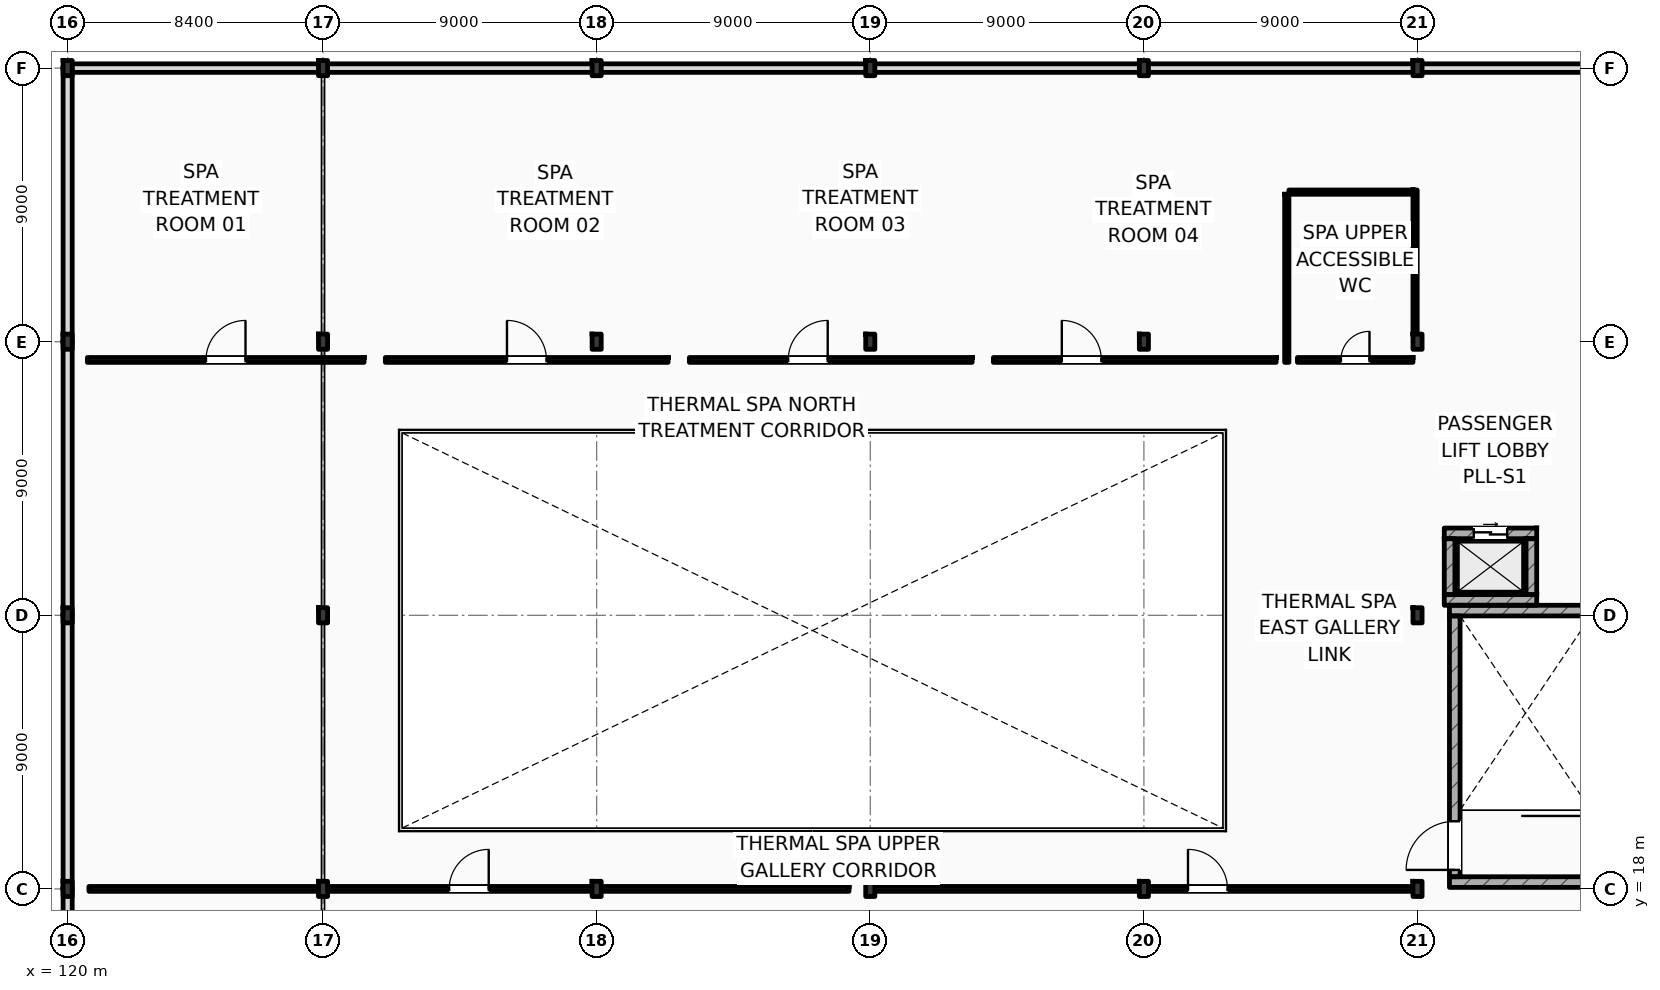
"""IFC4 building model, lengths in metres.
Left out: names, types, materials, properties, quantities, classifications, styles, units other than length and angle.
Written with IfcOpenShell. Run it as: python <this file> out.ifc"""

import sys

from ifc_helpers import new_model, si_unit, direction, frame, frame_2d, origin, origin_2d, place, context, subcontext, project, spatial, rectangle, i_section, extrude, element, fill, save


model = new_model("IFC4")
c1 = context("Model", 3, precision=1e-05, world=origin(), true_north=direction((0.0, 1.0)))
c2 = subcontext(c1, "Body", "Model", "MODEL_VIEW")
j1 = project(units=[si_unit("LENGTHUNIT", "METRE"), si_unit("PLANEANGLEUNIT", "RADIAN")], contexts=[c1])
p1 = place(None, origin())
s1 = spatial("IfcSite", under=j1, at=p1, CompositionType="ELEMENT")
p2 = place(p1, origin())
s2 = spatial("IfcBuilding", under=s1, at=p2, CompositionType="ELEMENT")
p3 = place(p2, frame((0.0, 0.0, 6.0)))
s3 = spatial("IfcBuildingStorey", under=s2, at=p3, CompositionType="ELEMENT", Elevation=6.0)
for number, where, z_axis, x_axis in (
    (1, (120.0, 18.0, 0.0), (0.0, 0.0, 1.0), (1.0, 0.0, 0.0)),
    (2, (120.0, 27.0, 0.0), (0.0, 0.0, 1.0), (1.0, 0.0, 0.0)),
    (3, (120.0, 36.0, 0.0), (0.0, 0.0, 1.0), (1.0, 0.0, 0.0)),
    (4, (120.0, 45.0, 0.0), (0.0, 0.0, 1.0), (1.0, 0.0, 0.0)),
    (5, (128.4, 18.0, 0.0), (0.0, 0.0, 1.0), (1.0, 0.0, 0.0)),
    (6, (128.4, 27.0, 0.0), (0.0, 0.0, 1.0), (1.0, 0.0, 0.0)),
    (7, (128.4, 36.0, 0.0), (0.0, 0.0, 1.0), (1.0, 0.0, 0.0)),
    (8, (128.4, 45.0, 0.0), (0.0, 0.0, 1.0), (1.0, 0.0, 0.0)),
    (9, (137.4, 18.0, 0.0), (0.0, 0.0, 1.0), (1.0, 0.0, 0.0)),
    (10, (137.4, 36.0, 0.0), (0.0, 0.0, 1.0), (1.0, 0.0, 0.0)),
    (11, (137.4, 45.0, 0.0), (0.0, 0.0, 1.0), (1.0, 0.0, 0.0)),
    (12, (146.4, 18.0, 0.0), (0.0, 0.0, 1.0), (1.0, 0.0, 0.0)),
    (13, (146.4, 36.0, 0.0), (0.0, 0.0, 1.0), (1.0, 0.0, 0.0)),
    (14, (146.4, 45.0, 0.0), (0.0, 0.0, 1.0), (1.0, 0.0, 0.0)),
    (15, (155.4, 18.0, 0.0), (0.0, 0.0, 1.0), (1.0, 0.0, 0.0)),
    (16, (155.4, 36.0, 0.0), (0.0, 0.0, 1.0), (1.0, 0.0, 0.0)),
    (17, (155.4, 45.0, 0.0), (0.0, 0.0, 1.0), (1.0, 0.0, 0.0)),
    (18, (164.4, 18.0, 0.0), (0.0, 0.0, 1.0), (1.0, 0.0, 0.0)),
    (19, (164.4, 27.0, 0.0), (0.0, 0.0, 1.0), (1.0, 0.0, 0.0)),
    (20, (164.4, 36.0, 0.0), (0.0, 0.0, 1.0), (1.0, 0.0, 0.0)),
    (21, (164.4, 45.0, 0.0), (0.0, 0.0, 1.0), (1.0, 0.0, 0.0)),
):
    element("IfcColumn", number, at=place(p3, frame(where, z_axis=z_axis, x_axis=x_axis)), inside=s3, PredefinedType="COLUMN", context=c2, shape_type="SweptSolid", body=[
        extrude(i_section(OverallWidth=0.3, OverallDepth=0.5, WebThickness=0.014, FlangeThickness=0.028, FilletRadius=0.027, at=origin_2d()), origin(), (0.0, 0.0, 1.0), 5.4),
    ])
for number, where, z_axis, x_axis in (
    (22, (165.45, 27.155, 0.0), (0.0, 0.0, 1.0), (1.0, 0.0, 0.0)),
    (23, (165.45, 18.225, 0.0), (0.0, 0.0, 1.0), (1.0, 0.0, 0.0)),
):
    element("IfcWall", number, at=place(p3, frame(where, z_axis=z_axis, x_axis=x_axis)), inside=s3, PredefinedType="SHEAR", context=c2, shape_type="SweptSolid", body=[
        extrude(rectangle(XDim=5.0, YDim=0.35, at=frame_2d((2.5, 0.0))), origin(), (0.0, 0.0, 1.0), 5.4),
    ])
p4 = place(p3, frame((165.625, 18.4, 0.0), z_axis=(0.0, 0.0, 1.0), x_axis=(0.0, 1.0, 0.0)))
e24 = element("IfcWall", 24, at=p4, inside=s3, PredefinedType="SHEAR", context=c2, shape_type="SweptSolid", body=[
    extrude(rectangle(XDim=8.58, YDim=0.35, at=frame_2d((4.29, 0.0))), origin(), (0.0, 0.0, 1.0), 5.4),
])
p5 = place(p4, frame((0.225, 0.0, 0.0)))
e25 = element("IfcOpeningElement", 25, at=p5, cuts=e24, PredefinedType="OPENING", context=c2, shape_type="SweptSolid", body=[
    extrude(rectangle(XDim=1.6, YDim=2.2, at=frame_2d((0.8, 1.1))), frame((0.0, 0.185, 0.0), z_axis=(0.0, -1.0, 0.0), x_axis=(1.0, 0.0, 0.0)), (0.0, 0.0, 1.0), 0.37),
])
p6 = place(p3, frame((120.0, 45.0, 0.0), z_axis=(0.0, 0.0, 1.0), x_axis=(1.0, 0.0, 0.0)))
e26 = element("IfcWall", 26, at=p6, inside=s3, PredefinedType="STANDARD", context=c2, shape_type="SweptSolid", body=[
    extrude(rectangle(XDim=8.4, YDim=0.28, at=frame_2d((4.2, 0.0))), origin(), (0.0, 0.0, 1.0), 4.49),
])
for number, where, z_axis, x_axis in (
    (27, (128.4, 45.0, 0.0), (0.0, 0.0, 1.0), (1.0, 0.0, 0.0)),
    (28, (137.4, 45.0, 0.0), (0.0, 0.0, 1.0), (1.0, 0.0, 0.0)),
    (29, (146.4, 45.0, 0.0), (0.0, 0.0, 1.0), (1.0, 0.0, 0.0)),
    (30, (155.4, 45.0, 0.0), (0.0, 0.0, 1.0), (1.0, 0.0, 0.0)),
):
    element("IfcWall", number, at=place(p3, frame(where, z_axis=z_axis, x_axis=x_axis)), inside=s3, PredefinedType="STANDARD", context=c2, shape_type="SweptSolid", body=[
        extrude(rectangle(XDim=9.0, YDim=0.28, at=frame_2d((4.5, 0.0))), origin(), (0.0, 0.0, 1.0), 4.44),
    ])
p7 = place(p3, frame((164.4, 45.0, 0.0), z_axis=(0.0, 0.0, 1.0), x_axis=(1.0, 0.0, 0.0)))
e31 = element("IfcWall", 31, at=p7, inside=s3, PredefinedType="STANDARD", context=c2, shape_type="SweptSolid", body=[
    extrude(rectangle(XDim=7.6, YDim=0.28, at=frame_2d((3.8, 0.0))), origin(), (0.0, 0.0, 1.0), 4.54),
])
for number, where, z_axis, x_axis in (
    (32, (120.0, 9.0, 0.0), (0.0, 0.0, 1.0), (0.0, 1.0, 0.0)),
    (33, (120.0, 18.0, 0.0), (0.0, 0.0, 1.0), (0.0, 1.0, 0.0)),
    (34, (120.0, 27.0, 0.0), (0.0, 0.0, 1.0), (0.0, 1.0, 0.0)),
    (35, (120.0, 36.0, 0.0), (0.0, 0.0, 1.0), (0.0, 1.0, 0.0)),
):
    element("IfcWall", number, at=place(p3, frame(where, z_axis=z_axis, x_axis=x_axis)), inside=s3, PredefinedType="STANDARD", context=c2, shape_type="SweptSolid", body=[
        extrude(rectangle(XDim=9.0, YDim=0.3, at=frame_2d((4.5, 0.0))), origin(), (0.0, 0.0, 1.0), 4.55),
    ])
p8 = place(p3, frame((165.28, 29.695, 0.0), z_axis=(0.0, 0.0, 1.0), x_axis=(1.0, 0.0, 0.0)))
e36 = element("IfcWall", 36, at=p8, inside=s3, PredefinedType="SHEAR", context=c2, shape_type="SweptSolid", body=[
    extrude(rectangle(XDim=3.04, YDim=0.35, at=frame_2d((1.52, 0.0))), origin(), (0.0, 0.0, 1.0), 5.05),
])
p9 = place(p8, frame((0.97, 0.0, 0.0)))
e37 = element("IfcOpeningElement", 37, at=p9, cuts=e36, PredefinedType="OPENING", context=c2, shape_type="SweptSolid", body=[
    extrude(rectangle(XDim=1.1, YDim=2.2, at=frame_2d((0.55, 1.1))), frame((0.0, 0.185, 0.0), z_axis=(0.0, -1.0, 0.0), x_axis=(1.0, 0.0, 0.0)), (0.0, 0.0, 1.0), 0.37),
])
p10 = place(p3, frame((165.28, 27.505, 0.0), z_axis=(0.0, 0.0, 1.0), x_axis=(1.0, 0.0, 0.0)))
e38 = element("IfcWall", 38, at=p10, inside=s3, PredefinedType="SHEAR", context=c2, shape_type="SweptSolid", body=[
    extrude(rectangle(XDim=3.04, YDim=0.35, at=frame_2d((1.52, 0.0))), origin(), (0.0, 0.0, 1.0), 5.05),
])
for number, where, z_axis, x_axis in (
    (39, (165.455, 27.68, 0.0), (0.0, 0.0, 1.0), (0.0, 1.0, 0.0)),
    (40, (168.145, 27.68, 0.0), (0.0, 0.0, 1.0), (0.0, 1.0, 0.0)),
):
    element("IfcWall", number, at=place(p3, frame(where, z_axis=z_axis, x_axis=x_axis)), inside=s3, PredefinedType="SHEAR", context=c2, shape_type="SweptSolid", body=[
        extrude(rectangle(XDim=1.84, YDim=0.35, at=frame_2d((0.92, 0.0))), origin(), (0.0, 0.0, 1.0), 5.05),
    ])
p11 = place(p3, frame((120.7, 18.0, 0.0), z_axis=(0.0, 0.0, 1.0), x_axis=(1.0, 0.0, 0.0)))
e41 = element("IfcWall", 41, at=p11, inside=s3, PredefinedType="PARTITIONING", context=c2, shape_type="SweptSolid", body=[
    extrude(rectangle(XDim=25.0, YDim=0.16, at=frame_2d((12.5, 0.0))), origin(), (0.0, 0.0, 1.0), 4.44),
])
p12 = place(p11, frame((11.85, 0.0, 0.0)))
e42 = element("IfcOpeningElement", 42, at=p12, cuts=e41, PredefinedType="OPENING", context=c2, shape_type="SweptSolid", body=[
    extrude(rectangle(XDim=1.3, YDim=2.2, at=frame_2d((0.65, 1.1))), frame((0.0, 0.09, 0.0), z_axis=(0.0, -1.0, 0.0), x_axis=(1.0, 0.0, 0.0)), (0.0, 0.0, 1.0), 0.18),
])
p13 = place(p3, frame((146.5, 18.0, 0.0), z_axis=(0.0, 0.0, 1.0), x_axis=(1.0, 0.0, 0.0)))
e43 = element("IfcWall", 43, at=p13, inside=s3, PredefinedType="PARTITIONING", context=c2, shape_type="SweptSolid", body=[
    extrude(rectangle(XDim=18.0, YDim=0.16, at=frame_2d((9.0, 0.0))), origin(), (0.0, 0.0, 1.0), 4.44),
])
p14 = place(p13, frame((10.35, 0.0, 0.0)))
e44 = element("IfcOpeningElement", 44, at=p14, cuts=e43, PredefinedType="OPENING", context=c2, shape_type="SweptSolid", body=[
    extrude(rectangle(XDim=1.3, YDim=2.2, at=frame_2d((0.65, 1.1))), frame((0.0, 0.09, 0.0), z_axis=(0.0, -1.0, 0.0), x_axis=(1.0, 0.0, 0.0)), (0.0, 0.0, 1.0), 0.18),
])
p15 = place(p3, frame((120.65, 35.4, 0.0), z_axis=(0.0, 0.0, 1.0), x_axis=(1.0, 0.0, 0.0)))
e45 = element("IfcWall", 45, at=p15, inside=s3, PredefinedType="PARTITIONING", context=c2, shape_type="SweptSolid", body=[
    extrude(rectangle(XDim=9.1, YDim=0.16, at=frame_2d((4.55, 0.0))), origin(), (0.0, 0.0, 1.0), 5.05),
])
p16 = place(p15, frame((3.9, 0.0, 0.0)))
e46 = element("IfcOpeningElement", 46, at=p16, cuts=e45, PredefinedType="OPENING", context=c2, shape_type="SweptSolid", body=[
    extrude(rectangle(XDim=1.3, YDim=2.2, at=frame_2d((0.65, 1.1))), frame((0.0, 0.09, 0.0), z_axis=(0.0, -1.0, 0.0), x_axis=(1.0, 0.0, 0.0)), (0.0, 0.0, 1.0), 0.18),
])
p17 = place(p3, frame((130.45, 35.4, 0.0), z_axis=(0.0, 0.0, 1.0), x_axis=(1.0, 0.0, 0.0)))
e47 = element("IfcWall", 47, at=p17, inside=s3, PredefinedType="PARTITIONING", context=c2, shape_type="SweptSolid", body=[
    extrude(rectangle(XDim=9.3, YDim=0.16, at=frame_2d((4.65, 0.0))), origin(), (0.0, 0.0, 1.0), 5.05),
])
p18 = place(p17, frame((4.0, 0.0, 0.0)))
e48 = element("IfcOpeningElement", 48, at=p18, cuts=e47, PredefinedType="OPENING", context=c2, shape_type="SweptSolid", body=[
    extrude(rectangle(XDim=1.3, YDim=2.2, at=frame_2d((0.65, 1.1))), frame((0.0, 0.09, 0.0), z_axis=(0.0, -1.0, 0.0), x_axis=(1.0, 0.0, 0.0)), (0.0, 0.0, 1.0), 0.18),
])
p19 = place(p3, frame((140.45, 35.4, 0.0), z_axis=(0.0, 0.0, 1.0), x_axis=(1.0, 0.0, 0.0)))
e49 = element("IfcWall", 49, at=p19, inside=s3, PredefinedType="PARTITIONING", context=c2, shape_type="SweptSolid", body=[
    extrude(rectangle(XDim=9.3, YDim=0.16, at=frame_2d((4.65, 0.0))), origin(), (0.0, 0.0, 1.0), 5.05),
])
p20 = place(p19, frame((3.25, 0.0, 0.0)))
e50 = element("IfcOpeningElement", 50, at=p20, cuts=e49, PredefinedType="OPENING", context=c2, shape_type="SweptSolid", body=[
    extrude(rectangle(XDim=1.3, YDim=2.2, at=frame_2d((0.65, 1.1))), frame((0.0, 0.09, 0.0), z_axis=(0.0, -1.0, 0.0), x_axis=(1.0, 0.0, 0.0)), (0.0, 0.0, 1.0), 0.18),
])
p21 = place(p3, frame((150.45, 35.4, 0.0), z_axis=(0.0, 0.0, 1.0), x_axis=(1.0, 0.0, 0.0)))
e51 = element("IfcWall", 51, at=p21, inside=s3, PredefinedType="PARTITIONING", context=c2, shape_type="SweptSolid", body=[
    extrude(rectangle(XDim=9.3, YDim=0.16, at=frame_2d((4.65, 0.0))), origin(), (0.0, 0.0, 1.0), 5.05),
])
p22 = place(p21, frame((2.25, 0.0, 0.0)))
e52 = element("IfcOpeningElement", 52, at=p22, cuts=e51, PredefinedType="OPENING", context=c2, shape_type="SweptSolid", body=[
    extrude(rectangle(XDim=1.3, YDim=2.2, at=frame_2d((0.65, 1.1))), frame((0.0, 0.09, 0.0), z_axis=(0.0, -1.0, 0.0), x_axis=(1.0, 0.0, 0.0)), (0.0, 0.0, 1.0), 0.18),
])
p23 = place(p3, frame((160.45, 35.4, 0.0), z_axis=(0.0, 0.0, 1.0), x_axis=(1.0, 0.0, 0.0)))
e53 = element("IfcWall", 53, at=p23, inside=s3, PredefinedType="PARTITIONING", context=c2, shape_type="SweptSolid", body=[
    extrude(rectangle(XDim=3.8, YDim=0.16, at=frame_2d((1.9, 0.0))), origin(), (0.0, 0.0, 1.0), 5.05),
])
p24 = place(p23, frame((1.43, 0.0, 0.0)))
e54 = element("IfcOpeningElement", 54, at=p24, cuts=e53, PredefinedType="OPENING", context=c2, shape_type="SweptSolid", body=[
    extrude(rectangle(XDim=0.94, YDim=2.15, at=frame_2d((0.47, 1.075))), frame((0.0, 0.09, 0.0), z_axis=(0.0, -1.0, 0.0), x_axis=(1.0, 0.0, 0.0)), (0.0, 0.0, 1.0), 0.18),
])
p25 = place(p3, frame((160.1, 35.32, 0.0), z_axis=(0.0, 0.0, 1.0), x_axis=(0.0, 1.0, 0.0)))
e55 = element("IfcWall", 55, at=p25, inside=s3, PredefinedType="PARTITIONING", context=c2, shape_type="SweptSolid", body=[
    extrude(rectangle(XDim=5.53, YDim=0.14, at=frame_2d((2.765, 0.0))), origin(), (0.0, 0.0, 1.0), 5.05),
])
p26 = place(p3, frame((160.17, 40.92, 0.0), z_axis=(0.0, 0.0, 1.0), x_axis=(1.0, 0.0, 0.0)))
e56 = element("IfcWall", 56, at=p26, inside=s3, PredefinedType="PARTITIONING", context=c2, shape_type="SweptSolid", body=[
    extrude(rectangle(XDim=4.08, YDim=0.14, at=frame_2d((2.04, 0.0))), origin(), (0.0, 0.0, 1.0), 5.05),
])
p27 = place(p3, frame((164.32, 36.3, 0.0), z_axis=(0.0, 0.0, 1.0), x_axis=(0.0, 1.0, 0.0)))
e57 = element("IfcWall", 57, at=p27, inside=s3, PredefinedType="PARTITIONING", context=c2, shape_type="SweptSolid", body=[
    extrude(rectangle(XDim=4.69, YDim=0.14, at=frame_2d((2.345, 0.0))), origin(), (0.0, 0.0, 1.0), 4.55),
])
p28 = place(p5, origin())
e58 = element("IfcDoor", 58, at=p28, inside=s3, OperationType="SINGLE_SWING_LEFT", PredefinedType="DOOR", context=c2, shape_type="SweptSolid", body=[
    extrude(rectangle(XDim=1.6, YDim=2.2, at=frame_2d((0.8, 1.1))), frame((0.0, 0.025, 0.0), z_axis=(0.0, -1.0, 0.0), x_axis=(1.0, 0.0, 0.0)), (0.0, 0.0, 1.0), 0.05),
])
fill(e25, e58)
p29 = place(p9, origin())
e59 = element("IfcDoor", 59, at=p29, inside=s3, OperationType="SLIDING_TO_LEFT", PredefinedType="DOOR", context=c2, shape_type="SweptSolid", body=[
    extrude(rectangle(XDim=1.1, YDim=2.2, at=frame_2d((0.55, 1.1))), frame((0.0, 0.025, 0.0), z_axis=(0.0, -1.0, 0.0), x_axis=(1.0, 0.0, 0.0)), (0.0, 0.0, 1.0), 0.05),
])
fill(e37, e59)
p30 = place(p12, origin())
e60 = element("IfcDoor", 60, at=p30, inside=s3, OperationType="SINGLE_SWING_RIGHT", PredefinedType="DOOR", context=c2, shape_type="SweptSolid", body=[
    extrude(rectangle(XDim=1.3, YDim=2.2, at=frame_2d((0.65, 1.1))), frame((0.0, 0.025, 0.0), z_axis=(0.0, -1.0, 0.0), x_axis=(1.0, 0.0, 0.0)), (0.0, 0.0, 1.0), 0.05),
])
fill(e42, e60)
p31 = place(p14, origin())
e61 = element("IfcDoor", 61, at=p31, inside=s3, OperationType="SINGLE_SWING_LEFT", PredefinedType="DOOR", context=c2, shape_type="SweptSolid", body=[
    extrude(rectangle(XDim=1.3, YDim=2.2, at=frame_2d((0.65, 1.1))), frame((0.0, 0.025, 0.0), z_axis=(0.0, -1.0, 0.0), x_axis=(1.0, 0.0, 0.0)), (0.0, 0.0, 1.0), 0.05),
])
fill(e44, e61)
p32 = place(p16, origin())
e62 = element("IfcDoor", 62, at=p32, inside=s3, OperationType="SINGLE_SWING_RIGHT", PredefinedType="DOOR", context=c2, shape_type="SweptSolid", body=[
    extrude(rectangle(XDim=1.3, YDim=2.2, at=frame_2d((0.65, 1.1))), frame((0.0, 0.025, 0.0), z_axis=(0.0, -1.0, 0.0), x_axis=(1.0, 0.0, 0.0)), (0.0, 0.0, 1.0), 0.05),
])
fill(e46, e62)
p33 = place(p18, origin())
e63 = element("IfcDoor", 63, at=p33, inside=s3, OperationType="SINGLE_SWING_LEFT", PredefinedType="DOOR", context=c2, shape_type="SweptSolid", body=[
    extrude(rectangle(XDim=1.3, YDim=2.2, at=frame_2d((0.65, 1.1))), frame((0.0, 0.025, 0.0), z_axis=(0.0, -1.0, 0.0), x_axis=(1.0, 0.0, 0.0)), (0.0, 0.0, 1.0), 0.05),
])
fill(e48, e63)
p34 = place(p20, origin())
e64 = element("IfcDoor", 64, at=p34, inside=s3, OperationType="SINGLE_SWING_RIGHT", PredefinedType="DOOR", context=c2, shape_type="SweptSolid", body=[
    extrude(rectangle(XDim=1.3, YDim=2.2, at=frame_2d((0.65, 1.1))), frame((0.0, 0.025, 0.0), z_axis=(0.0, -1.0, 0.0), x_axis=(1.0, 0.0, 0.0)), (0.0, 0.0, 1.0), 0.05),
])
fill(e50, e64)
p35 = place(p22, origin())
e65 = element("IfcDoor", 65, at=p35, inside=s3, OperationType="SINGLE_SWING_LEFT", PredefinedType="DOOR", context=c2, shape_type="SweptSolid", body=[
    extrude(rectangle(XDim=1.3, YDim=2.2, at=frame_2d((0.65, 1.1))), frame((0.0, 0.025, 0.0), z_axis=(0.0, -1.0, 0.0), x_axis=(1.0, 0.0, 0.0)), (0.0, 0.0, 1.0), 0.05),
])
fill(e52, e65)
p36 = place(p24, origin())
e66 = element("IfcDoor", 66, at=p36, inside=s3, OperationType="SINGLE_SWING_RIGHT", PredefinedType="DOOR", context=c2, shape_type="SweptSolid", body=[
    extrude(rectangle(XDim=0.94, YDim=2.15, at=frame_2d((0.47, 1.075))), frame((0.0, 0.025, 0.0), z_axis=(0.0, -1.0, 0.0), x_axis=(1.0, 0.0, 0.0)), (0.0, 0.0, 1.0), 0.05),
])
fill(e54, e66)
save(model, sys.argv[1])
